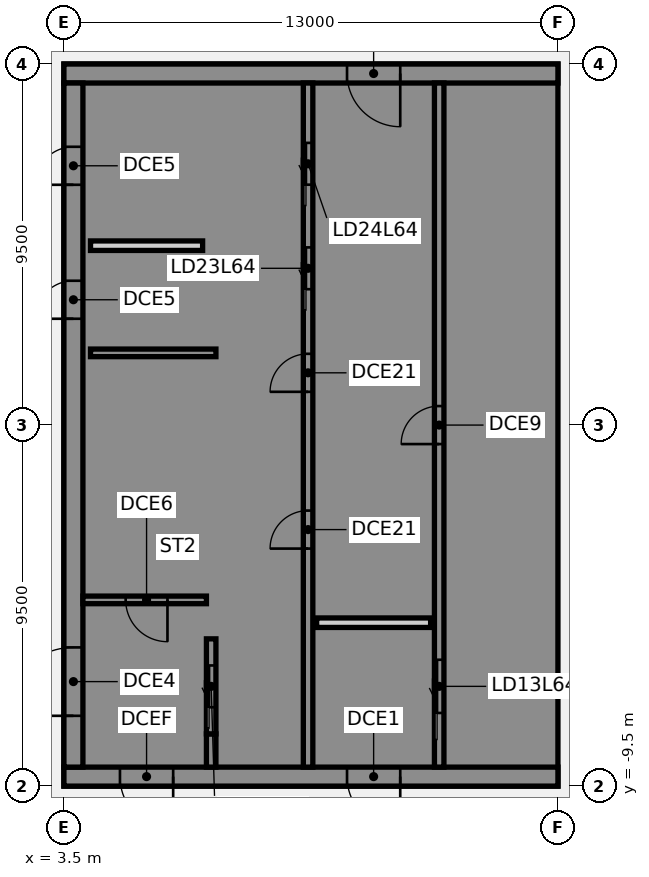
"""IFC4 building model, lengths in metres.
Left out: names, types, materials, properties, quantities, classifications, styles, units other than length and angle.
Written with IfcOpenShell. Run it as: python <this file> out.ifc"""

import sys

from ifc_helpers import new_model, si_unit, direction, frame, frame_2d, origin, place, context, subcontext, project, spatial, polyline, rectangle, outline, extrude, element, fill, save


model = new_model("IFC4")
c1 = context("Model", 3, precision=1e-05, world=origin(), true_north=direction((0.0, 1.0)))
c2 = subcontext(c1, "Body", "Model", "MODEL_VIEW")
j1 = project(units=[si_unit("LENGTHUNIT", "METRE"), si_unit("PLANEANGLEUNIT", "RADIAN")], contexts=[c1])
p1 = place(None, origin())
s1 = spatial("IfcSite", under=j1, at=p1, CompositionType="ELEMENT")
p2 = place(p1, origin())
s2 = spatial("IfcBuilding", under=s1, at=p2, CompositionType="ELEMENT")
p3 = place(p2, frame((0.0, 0.0, 252.3)))
s3 = spatial("IfcBuildingStorey", under=s2, at=p3, CompositionType="ELEMENT", Elevation=252.3)
p4 = place(p3, frame((16.5, -9.25, 0.0), z_axis=(0.0, 0.0, 1.0), x_axis=(-1.0, 0.0, 0.0)))
e1 = element("IfcWall", 1, at=p4, inside=s3, PredefinedType="SHEAR", context=c2, shape_type="SweptSolid", body=[
    extrude(rectangle(XDim=13.0, YDim=0.5, at=frame_2d((6.5, 0.0))), origin(), (0.0, 0.0, 1.0), 4.36),
])
p5 = place(p4, frame((4.15, 0.0, 0.0)))
e2 = element("IfcOpeningElement", 2, at=p5, cuts=e1, PredefinedType="OPENING", context=c2, shape_type="SweptSolid", body=[
    extrude(rectangle(XDim=1.4, YDim=2.1, at=frame_2d((0.7, 1.05))), frame((0.0, 0.26, 0.0), z_axis=(0.0, -1.0, 0.0), x_axis=(1.0, 0.0, 0.0)), (0.0, 0.0, 1.0), 0.52),
])
p6 = place(p4, frame((10.125, 0.0, 0.0)))
e3 = element("IfcOpeningElement", 3, at=p6, cuts=e1, PredefinedType="OPENING", context=c2, shape_type="SweptSolid", body=[
    extrude(rectangle(XDim=1.4, YDim=2.1, at=frame_2d((0.7, 1.05))), frame((0.0, 0.26, 0.0), z_axis=(0.0, -1.0, 0.0), x_axis=(1.0, 0.0, 0.0)), (0.0, 0.0, 1.0), 0.52),
])
p7 = place(p3, origin())
e4 = element("IfcWall", 4, at=p7, inside=s3, PredefinedType="SHEAR", context=c2, shape_type="SweptSolid", body=[
    extrude(outline(polyline([(13.5, -8.125), (13.5, -9.0), (16.0, -9.0), (16.5, -9.0), (16.5, 9.0), (16.0, 9.0), (13.5, 9.0), (13.5, 8.125), (16.0, 8.125), (16.0, 5.625), (13.5, 5.625), (13.5, 5.375), (16.0, 5.375), (16.0, -5.375), (13.5, -5.375), (13.5, -5.625), (16.0, -5.625), (16.0, -8.125), (13.5, -8.125)])), origin(), (0.0, 0.0, 1.0), 4.36),
])
p8 = place(p3, frame((16.5, 9.25, 0.0), z_axis=(0.0, 0.0, 1.0), x_axis=(-1.0, 0.0, 0.0)))
e5 = element("IfcWall", 5, at=p8, inside=s3, PredefinedType="SHEAR", context=c2, shape_type="SweptSolid", body=[
    extrude(rectangle(XDim=13.0, YDim=0.5, at=frame_2d((6.5, 0.0))), origin(), (0.0, 0.0, 1.0), 4.36),
])
p9 = place(p8, frame((4.15, 0.0, 0.0)))
e6 = element("IfcOpeningElement", 6, at=p9, cuts=e5, PredefinedType="OPENING", context=c2, shape_type="SweptSolid", body=[
    extrude(rectangle(XDim=1.4, YDim=2.1, at=frame_2d((0.7, 1.05))), frame((0.0, 0.26, 0.0), z_axis=(0.0, -1.0, 0.0), x_axis=(1.0, 0.0, 0.0)), (0.0, 0.0, 1.0), 0.52),
])
p10 = place(p3, origin())
e7 = element("IfcWall", 7, at=p10, inside=s3, PredefinedType="SHEAR", context=c2, shape_type="SweptSolid", body=[
    extrude(outline(polyline([(9.8, -5.375), (7.5, -5.375), (7.5, 2.625), (9.8, 2.625), (9.8, 2.875), (7.5, 2.875), (7.5, 5.375), (9.8, 5.375), (9.8, 5.625), (7.5, 5.625), (7.5, 8.125), (9.8, 8.125), (9.8, 9.0), (7.5, 9.0), (7.25, 9.0), (7.25, -5.625), (7.5, -5.625), (9.8, -5.625), (9.8, -5.375)])), origin(), (0.0, 0.0, 1.0), 4.36),
])
p11 = place(p3, origin())
e8 = element("IfcWall", 8, at=p11, inside=s3, PredefinedType="SHEAR", context=c2, shape_type="SweptSolid", body=[
    extrude(outline(polyline([(7.5, -8.125), (7.5, -9.0), (9.8, -9.0), (9.8, -8.125), (9.8, -5.625), (9.55, -5.625), (9.55, -8.125), (7.5, -8.125)])), origin(), (0.0, 0.0, 1.0), 4.36),
])
p12 = place(p3, frame((7.375, -9.0, 0.0), z_axis=(0.0, 0.0, 1.0), x_axis=(0.0, 1.0, 0.0)))
e9 = element("IfcWall", 9, at=p12, inside=s3, PredefinedType="SHEAR", context=c2, shape_type="SweptSolid", body=[
    extrude(rectangle(XDim=0.875, YDim=0.25, at=frame_2d((0.438, 0.0))), origin(), (0.0, 0.0, 1.0), 4.36),
])
p13 = place(p3, frame((7.5, 1.9, 0.0), z_axis=(0.0, 0.0, 1.0), x_axis=(-1.0, 0.0, 0.0)))
e10 = element("IfcWall", 10, at=p13, inside=s3, PredefinedType="SHEAR", context=c2, shape_type="SweptSolid", body=[
    extrude(rectangle(XDim=3.3, YDim=0.2, at=frame_2d((1.65, 0.0))), origin(), (0.0, 0.0, 1.0), 4.36),
])
p14 = place(p3, frame((13.375, -9.0, 0.0), z_axis=(0.0, 0.0, 1.0), x_axis=(0.0, 1.0, 0.0)))
e11 = element("IfcWall", 11, at=p14, inside=s3, PredefinedType="SHEAR", context=c2, shape_type="SweptSolid", body=[
    extrude(rectangle(XDim=18.0, YDim=0.25, at=frame_2d((9.0, 0.0))), origin(), (0.0, 0.0, 1.0), 4.36),
])
p15 = place(p14, frame((1.425, 0.0, 0.0)))
e12 = element("IfcOpeningElement", 12, at=p15, cuts=e11, PredefinedType="OPENING", context=c2, shape_type="SweptSolid", body=[
    extrude(rectangle(XDim=1.4, YDim=2.1, at=frame_2d((0.7, 1.05))), frame((0.0, 0.135, 0.0), z_axis=(0.0, -1.0, 0.0), x_axis=(1.0, 0.0, 0.0)), (0.0, 0.0, 1.0), 0.27),
])
p16 = place(p14, frame((8.5, 0.0, 0.0)))
e13 = element("IfcOpeningElement", 13, at=p16, cuts=e11, PredefinedType="OPENING", context=c2, shape_type="SweptSolid", body=[
    extrude(rectangle(XDim=1.0, YDim=2.1, at=frame_2d((0.5, 1.05))), frame((0.0, 0.135, 0.0), z_axis=(0.0, -1.0, 0.0), x_axis=(1.0, 0.0, 0.0)), (0.0, 0.0, 1.0), 0.27),
])
p17 = place(p3, frame((9.925, -9.0, 0.0), z_axis=(0.0, 0.0, 1.0), x_axis=(0.0, 1.0, 0.0)))
e14 = element("IfcWall", 14, at=p17, inside=s3, PredefinedType="SHEAR", context=c2, shape_type="SweptSolid", body=[
    extrude(rectangle(XDim=18.0, YDim=0.25, at=frame_2d((9.0, 0.0))), origin(), (0.0, 0.0, 1.0), 4.36),
])
p18 = place(p17, frame((12.575, 0.0, 0.0)))
e15 = element("IfcOpeningElement", 15, at=p18, cuts=e14, PredefinedType="OPENING", context=c2, shape_type="SweptSolid", body=[
    extrude(rectangle(XDim=1.1, YDim=2.1, at=frame_2d((0.55, 1.05))), frame((0.0, 0.135, 0.0), z_axis=(0.0, -1.0, 0.0), x_axis=(1.0, 0.0, 0.0)), (0.0, 0.0, 1.0), 0.27),
])
p19 = place(p17, frame((15.325, 0.0, 0.0)))
e16 = element("IfcOpeningElement", 16, at=p19, cuts=e14, PredefinedType="OPENING", context=c2, shape_type="SweptSolid", body=[
    extrude(rectangle(XDim=1.1, YDim=2.1, at=frame_2d((0.55, 1.05))), frame((0.0, 0.135, 0.0), z_axis=(0.0, -1.0, 0.0), x_axis=(1.0, 0.0, 0.0)), (0.0, 0.0, 1.0), 0.27),
])
p20 = place(p17, frame((5.75, 0.0, 0.0)))
e17 = element("IfcOpeningElement", 17, at=p20, cuts=e14, PredefinedType="OPENING", context=c2, shape_type="SweptSolid", body=[
    extrude(rectangle(XDim=1.0, YDim=2.1, at=frame_2d((0.5, 1.05))), frame((0.0, 0.135, 0.0), z_axis=(0.0, -1.0, 0.0), x_axis=(1.0, 0.0, 0.0)), (0.0, 0.0, 1.0), 0.27),
])
p21 = place(p17, frame((9.875, 0.0, 0.0)))
e18 = element("IfcOpeningElement", 18, at=p21, cuts=e14, PredefinedType="OPENING", context=c2, shape_type="SweptSolid", body=[
    extrude(rectangle(XDim=1.0, YDim=2.1, at=frame_2d((0.5, 1.05))), frame((0.0, 0.135, 0.0), z_axis=(0.0, -1.0, 0.0), x_axis=(1.0, 0.0, 0.0)), (0.0, 0.0, 1.0), 0.27),
])
p22 = place(p3, frame((7.375, -8.125, 0.0), z_axis=(0.0, 0.0, 1.0), x_axis=(0.0, 1.0, 0.0)))
e19 = element("IfcWall", 19, at=p22, inside=s3, PredefinedType="SHEAR", context=c2, shape_type="SweptSolid", body=[
    extrude(rectangle(XDim=2.5, YDim=0.25, at=frame_2d((1.25, 0.0))), origin(), (0.0, 0.0, 1.0), 4.36),
])
p23 = place(p22, frame((0.7, 0.0, 0.0)))
e20 = element("IfcOpeningElement", 20, at=p23, cuts=e19, PredefinedType="OPENING", context=c2, shape_type="SweptSolid", body=[
    extrude(rectangle(XDim=1.1, YDim=2.1, at=frame_2d((0.55, 1.05))), frame((0.0, 0.135, 0.0), z_axis=(0.0, -1.0, 0.0), x_axis=(1.0, 0.0, 0.0)), (0.0, 0.0, 1.0), 0.27),
])
p24 = place(p3, frame((3.75, -9.0, 0.0), z_axis=(0.0, 0.0, 1.0), x_axis=(0.0, 1.0, 0.0)))
e21 = element("IfcWall", 21, at=p24, inside=s3, PredefinedType="SHEAR", context=c2, shape_type="SweptSolid", body=[
    extrude(rectangle(XDim=18.0, YDim=0.5, at=frame_2d((9.0, 0.0))), origin(), (0.0, 0.0, 1.0), 4.36),
])
p25 = place(p24, frame((1.35, 0.0, 0.0)))
e22 = element("IfcOpeningElement", 22, at=p25, cuts=e21, PredefinedType="OPENING", context=c2, shape_type="SweptSolid", body=[
    extrude(rectangle(XDim=1.8, YDim=2.1, at=frame_2d((0.9, 1.05))), frame((0.0, 0.26, 0.0), z_axis=(0.0, -1.0, 0.0), x_axis=(1.0, 0.0, 0.0)), (0.0, 0.0, 1.0), 0.52),
])
p26 = place(p24, frame((11.798, 0.0, 0.0)))
e23 = element("IfcOpeningElement", 23, at=p26, cuts=e21, PredefinedType="OPENING", context=c2, shape_type="SweptSolid", body=[
    extrude(rectangle(XDim=1.0, YDim=2.1, at=frame_2d((0.5, 1.05))), frame((0.0, 0.26, 0.0), z_axis=(0.0, -1.0, 0.0), x_axis=(1.0, 0.0, 0.0)), (0.0, 0.0, 1.0), 0.52),
])
p27 = place(p24, frame((15.323, 0.0, 0.0)))
e24 = element("IfcOpeningElement", 24, at=p27, cuts=e21, PredefinedType="OPENING", context=c2, shape_type="SweptSolid", body=[
    extrude(rectangle(XDim=1.0, YDim=2.1, at=frame_2d((0.5, 1.05))), frame((0.0, 0.26, 0.0), z_axis=(0.0, -1.0, 0.0), x_axis=(1.0, 0.0, 0.0)), (0.0, 0.0, 1.0), 0.52),
])
p28 = place(p3, frame((7.15, 4.72, 0.0), z_axis=(0.0, 0.0, 1.0), x_axis=(-1.0, 0.0, 0.0)))
e25 = element("IfcWall", 25, at=p28, inside=s3, PredefinedType="PARTITIONING", context=c2, shape_type="SweptSolid", body=[
    extrude(rectangle(XDim=2.95, YDim=0.25, at=frame_2d((1.475, 0.0))), origin(), (0.0, 0.0, 1.0), 4.36),
])
p29 = place(p3, frame((7.25, -4.6, 0.0), z_axis=(0.0, 0.0, 1.0), x_axis=(-1.0, 0.0, 0.0)))
e26 = element("IfcWall", 26, at=p29, inside=s3, PredefinedType="SHEAR", context=c2, shape_type="SweptSolid", body=[
    extrude(rectangle(XDim=3.25, YDim=0.2, at=frame_2d((1.625, 0.0))), origin(), (0.0, 0.0, 1.0), 4.36),
])
p30 = place(p29, frame((1.025, 0.0, 0.0)))
e27 = element("IfcOpeningElement", 27, at=p30, cuts=e26, PredefinedType="OPENING", context=c2, shape_type="SweptSolid", body=[
    extrude(rectangle(XDim=1.1, YDim=2.1, at=frame_2d((0.55, 1.05))), frame((0.0, 0.11, 0.0), z_axis=(0.0, -1.0, 0.0), x_axis=(1.0, 0.0, 0.0)), (0.0, 0.0, 1.0), 0.22),
])
p31 = place(p3, frame((13.15, -5.2, 0.0), z_axis=(0.0, 0.0, 1.0), x_axis=(-1.0, 0.0, 0.0)))
e28 = element("IfcWall", 28, at=p31, inside=s3, PredefinedType="PARTITIONING", context=c2, shape_type="SweptSolid", body=[
    extrude(rectangle(XDim=3.0, YDim=0.25, at=frame_2d((1.5, 0.0))), origin(), (0.0, 0.0, 1.0), 4.36),
])
p32 = place(p5, origin())
e29 = element("IfcDoor", 29, at=p32, inside=s3, OperationType="SINGLE_SWING_LEFT", PredefinedType="DOOR", context=c2, shape_type="SweptSolid", body=[
    extrude(rectangle(XDim=1.4, YDim=2.1, at=frame_2d((0.7, 1.05))), frame((0.0, 0.025, 0.0), z_axis=(0.0, -1.0, 0.0), x_axis=(1.0, 0.0, 0.0)), (0.0, 0.0, 1.0), 0.05),
])
fill(e2, e29)
p33 = place(p6, origin())
e30 = element("IfcDoor", 30, at=p33, inside=s3, OperationType="SINGLE_SWING_LEFT", PredefinedType="DOOR", context=c2, shape_type="SweptSolid", body=[
    extrude(rectangle(XDim=1.4, YDim=2.1, at=frame_2d((0.7, 1.05))), frame((0.0, 0.025, 0.0), z_axis=(0.0, -1.0, 0.0), x_axis=(1.0, 0.0, 0.0)), (0.0, 0.0, 1.0), 0.05),
])
fill(e3, e30)
p34 = place(p25, origin())
e31 = element("IfcDoor", 31, at=p34, inside=s3, OperationType="SINGLE_SWING_LEFT", PredefinedType="DOOR", context=c2, shape_type="SweptSolid", body=[
    extrude(rectangle(XDim=1.8, YDim=2.1, at=frame_2d((0.9, 1.05))), frame((0.0, 0.025, 0.0), z_axis=(0.0, -1.0, 0.0), x_axis=(1.0, 0.0, 0.0)), (0.0, 0.0, 1.0), 0.05),
])
fill(e22, e31)
p35 = place(p26, origin())
e32 = element("IfcDoor", 32, at=p35, inside=s3, OperationType="SINGLE_SWING_LEFT", PredefinedType="DOOR", context=c2, shape_type="SweptSolid", body=[
    extrude(rectangle(XDim=1.0, YDim=2.1, at=frame_2d((0.5, 1.05))), frame((0.0, -0.175, 0.0), z_axis=(0.0, -1.0, 0.0), x_axis=(1.0, 0.0, 0.0)), (0.0, 0.0, 1.0), 0.05),
])
fill(e23, e32)
p36 = place(p27, origin())
e33 = element("IfcDoor", 33, at=p36, inside=s3, OperationType="SINGLE_SWING_LEFT", PredefinedType="DOOR", context=c2, shape_type="SweptSolid", body=[
    extrude(rectangle(XDim=1.0, YDim=2.1, at=frame_2d((0.5, 1.05))), frame((0.0, -0.175, 0.0), z_axis=(0.0, -1.0, 0.0), x_axis=(1.0, 0.0, 0.0)), (0.0, 0.0, 1.0), 0.05),
])
fill(e24, e33)
p37 = place(p30, origin())
e34 = element("IfcDoor", 34, at=p37, inside=s3, OperationType="SINGLE_SWING_LEFT", PredefinedType="DOOR", context=c2, shape_type="SweptSolid", body=[
    extrude(rectangle(XDim=1.1, YDim=2.1, at=frame_2d((0.55, 1.05))), frame((0.0, 0.025, 0.0), z_axis=(0.0, -1.0, 0.0), x_axis=(1.0, 0.0, 0.0)), (0.0, 0.0, 1.0), 0.05),
])
fill(e27, e34)
p38 = place(p15, origin())
e35 = element("IfcDoor", 35, at=p38, inside=s3, OperationType="SLIDING_TO_LEFT", PredefinedType="DOOR", context=c2, shape_type="SweptSolid", body=[
    extrude(rectangle(XDim=1.4, YDim=2.1, at=frame_2d((0.7, 1.05))), frame((0.0, 0.025, 0.0), z_axis=(0.0, -1.0, 0.0), x_axis=(1.0, 0.0, 0.0)), (0.0, 0.0, 1.0), 0.05),
])
fill(e12, e35)
p39 = place(p23, origin())
e36 = element("IfcDoor", 36, at=p39, inside=s3, OperationType="SLIDING_TO_LEFT", PredefinedType="DOOR", context=c2, shape_type="SweptSolid", body=[
    extrude(rectangle(XDim=1.1, YDim=2.1, at=frame_2d((0.55, 1.05))), frame((0.0, 0.025, 0.0), z_axis=(0.0, -1.0, 0.0), x_axis=(1.0, 0.0, 0.0)), (0.0, 0.0, 1.0), 0.05),
])
fill(e20, e36)
p40 = place(p18, origin())
e37 = element("IfcDoor", 37, at=p40, inside=s3, OperationType="SLIDING_TO_LEFT", PredefinedType="DOOR", context=c2, shape_type="SweptSolid", body=[
    extrude(rectangle(XDim=1.1, YDim=2.1, at=frame_2d((0.55, 1.05))), frame((0.0, 0.025, 0.0), z_axis=(0.0, -1.0, 0.0), x_axis=(1.0, 0.0, 0.0)), (0.0, 0.0, 1.0), 0.05),
])
fill(e15, e37)
p41 = place(p19, origin())
e38 = element("IfcDoor", 38, at=p41, inside=s3, OperationType="SLIDING_TO_LEFT", PredefinedType="DOOR", context=c2, shape_type="SweptSolid", body=[
    extrude(rectangle(XDim=1.1, YDim=2.1, at=frame_2d((0.55, 1.05))), frame((0.0, 0.025, 0.0), z_axis=(0.0, -1.0, 0.0), x_axis=(1.0, 0.0, 0.0)), (0.0, 0.0, 1.0), 0.05),
])
fill(e16, e38)
p42 = place(p9, origin())
e39 = element("IfcDoor", 39, at=p42, inside=s3, OperationType="SINGLE_SWING_LEFT", PredefinedType="DOOR", context=c2, shape_type="SweptSolid", body=[
    extrude(rectangle(XDim=1.4, YDim=2.1, at=frame_2d((0.7, 1.05))), frame((0.0, 0.025, 0.0), z_axis=(0.0, -1.0, 0.0), x_axis=(1.0, 0.0, 0.0)), (0.0, 0.0, 1.0), 0.05),
])
fill(e6, e39)
p43 = place(p16, origin())
e40 = element("IfcDoor", 40, at=p43, inside=s3, OperationType="SINGLE_SWING_LEFT", PredefinedType="DOOR", context=c2, shape_type="SweptSolid", body=[
    extrude(rectangle(XDim=1.0, YDim=2.1, at=frame_2d((0.5, 1.05))), frame((0.0, 0.025, 0.0), z_axis=(0.0, -1.0, 0.0), x_axis=(1.0, 0.0, 0.0)), (0.0, 0.0, 1.0), 0.05),
])
fill(e13, e40)
p44 = place(p20, origin())
e41 = element("IfcDoor", 41, at=p44, inside=s3, OperationType="SINGLE_SWING_LEFT", PredefinedType="DOOR", context=c2, shape_type="SweptSolid", body=[
    extrude(rectangle(XDim=1.0, YDim=2.1, at=frame_2d((0.5, 1.05))), frame((0.0, 0.025, 0.0), z_axis=(0.0, -1.0, 0.0), x_axis=(1.0, 0.0, 0.0)), (0.0, 0.0, 1.0), 0.05),
])
fill(e17, e41)
p45 = place(p21, origin())
e42 = element("IfcDoor", 42, at=p45, inside=s3, OperationType="SINGLE_SWING_LEFT", PredefinedType="DOOR", context=c2, shape_type="SweptSolid", body=[
    extrude(rectangle(XDim=1.0, YDim=2.1, at=frame_2d((0.5, 1.05))), frame((0.0, 0.025, 0.0), z_axis=(0.0, -1.0, 0.0), x_axis=(1.0, 0.0, 0.0)), (0.0, 0.0, 1.0), 0.05),
])
fill(e18, e42)
save(model, sys.argv[1])
